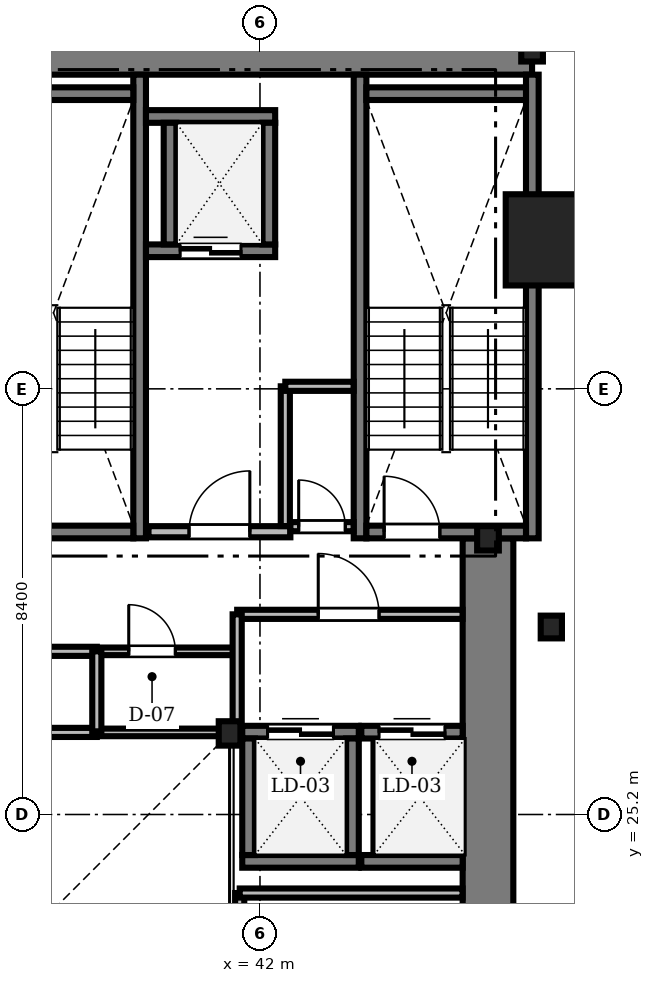
"""IFC4 building model, lengths in metres.
Left out: names, types, materials, properties, quantities, classifications, styles, units other than length and angle.
Written with IfcOpenShell. Run it as: python <this file> out.ifc"""

import sys

from ifc_helpers import new_model, si_unit, direction, frame, frame_2d, origin, origin_2d, place, context, subcontext, project, spatial, rectangle, i_section, extrude, source, transform, mapped, element, fill, save


model = new_model("IFC4")
c1 = context("Model", 3, precision=1e-05, world=origin(), true_north=direction((0.0, 1.0)))
c2 = subcontext(c1, "Body", "Model", "MODEL_VIEW")
j1 = project(units=[si_unit("LENGTHUNIT", "METRE"), si_unit("PLANEANGLEUNIT", "RADIAN")], contexts=[c1])
p1 = place(None, origin())
s1 = spatial("IfcSite", under=j1, at=p1, CompositionType="ELEMENT")
p2 = place(p1, origin())
s2 = spatial("IfcBuilding", under=s1, at=p2, CompositionType="ELEMENT")
p3 = place(p2, frame((0.0, 0.0, 38.55)))
s3 = spatial("IfcBuildingStorey", under=s2, at=p3, CompositionType="ELEMENT", Elevation=38.55)
m1 = source(origin(), c2, "Body", "SweptSolid", [
    extrude(rectangle(XDim=17.52, YDim=1.0, at=frame_2d((8.76, 0.0))), origin(), (0.0, 0.0, 1.0), 3.41),
])
p4 = place(p3, frame((29.85, 40.3, 0.0), z_axis=(0.0, 0.0, 1.0), x_axis=(1.0, 0.0, 0.0)))
e1 = element("IfcWall", 1, at=p4, inside=s3, PredefinedType="SHEAR", context=c2, shape_type="MappedRepresentation", body=[
    mapped(m1, transform((0.0, 0.0, 0.0), scale=1.0)),
])
m2 = source(origin(), c2, "Body", "SweptSolid", [
    extrude(rectangle(XDim=13.15, YDim=1.0, at=frame_2d((6.575, 0.0))), origin(), (0.0, 0.0, 1.0), 3.41),
])
p5 = place(p3, frame((46.5, 17.5, 0.0), z_axis=(0.0, 0.0, 1.0), x_axis=(0.0, 1.0, 0.0)))
e2 = element("IfcWall", 2, at=p5, inside=s3, PredefinedType="SHEAR", context=c2, shape_type="MappedRepresentation", body=[
    mapped(m2, transform((0.0, 0.0, 0.0), scale=1.0)),
])
m3 = source(origin(), c2, "Body", "SweptSolid", [
    extrude(i_section(OverallWidth=0.428, OverallDepth=0.481, WebThickness=0.04, FlangeThickness=0.063, FilletRadius=0.015, at=origin_2d()), origin(), (0.0, 0.0, 1.0), 3.41),
])
for number, where, z_axis, x_axis in (
    (3, (41.4, 26.8, 0.0), (0.0, 0.0, 1.0), (1.0, 0.0, 0.0)),
    (4, (46.5, 30.65, 0.0), (0.0, 0.0, 1.0), (1.0, 0.0, 0.0)),
    (5, (47.37, 40.3, 0.0), (0.0, 0.0, 1.0), (1.0, 0.0, 0.0)),
):
    element("IfcColumn", number, at=place(p3, frame(where, z_axis=z_axis, x_axis=x_axis)), inside=s3, PredefinedType="COLUMN", context=c2, shape_type="MappedRepresentation", body=[
        mapped(m3, transform((0.0, 0.0, 0.0), scale=1.0)),
    ])
m4 = source(origin(), c2, "Body", "SweptSolid", [
    extrude(rectangle(XDim=1.8, YDim=1.8, at=origin_2d()), origin(), (0.0, 0.0, 1.0), 3.41),
])
p6 = place(p3, frame((47.75, 36.54, 0.0), z_axis=(0.0, 0.0, 1.0), x_axis=(1.0, 0.0, 0.0)))
e6 = element("IfcColumn", 6, at=p6, inside=s3, PredefinedType="COLUMN", context=c2, shape_type="MappedRepresentation", body=[
    mapped(m4, transform((0.0, 0.0, 0.0), scale=1.0)),
])
m5 = source(origin(), c2, "Body", "SweptSolid", [
    extrude(i_section(OverallWidth=0.419, OverallDepth=0.449, WebThickness=0.031, FlangeThickness=0.048, FilletRadius=0.015, at=origin_2d()), origin(), (0.0, 0.0, 1.0), 3.41),
])
p7 = place(p3, frame((47.75, 28.9, 0.0), z_axis=(0.0, 0.0, 1.0), x_axis=(1.0, 0.0, 0.0)))
e7 = element("IfcColumn", 7, at=p7, inside=s3, PredefinedType="COLUMN", context=c2, shape_type="MappedRepresentation", body=[
    mapped(m5, transform((0.0, 0.0, 0.0), scale=1.0)),
])
m6 = source(origin(), c2, "Body", "SweptSolid", [
    extrude(rectangle(XDim=9.15, YDim=0.25, at=frame_2d((4.575, 0.0))), origin(), (0.0, 0.0, 1.0), 3.45),
])
p8 = place(p3, frame((39.625, 30.65, 0.0), z_axis=(0.0, 0.0, 1.0), x_axis=(0.0, 1.0, 0.0)))
e8 = element("IfcWall", 8, at=p8, inside=s3, PredefinedType="SOLIDWALL", context=c2, shape_type="MappedRepresentation", body=[
    mapped(m6, transform((0.0, 0.0, 0.0), scale=1.0)),
])
m7 = source(origin(), c2, "Body", "SweptSolid", [
    extrude(rectangle(XDim=3.15, YDim=0.25, at=frame_2d((1.575, 0.0))), origin(), (0.0, 0.0, 1.0), 3.45),
])
p9 = place(p3, frame((36.35, 39.425, 0.0), z_axis=(0.0, 0.0, 1.0), x_axis=(1.0, 0.0, 0.0)))
e9 = element("IfcWall", 9, at=p9, inside=s3, PredefinedType="SOLIDWALL", context=c2, shape_type="MappedRepresentation", body=[
    mapped(m7, transform((0.0, 0.0, 0.0), scale=1.0)),
])
p10 = place(p3, frame((36.35, 30.775, 0.0), z_axis=(0.0, 0.0, 1.0), x_axis=(1.0, 0.0, 0.0)))
e10 = element("IfcWall", 10, at=p10, inside=s3, PredefinedType="SOLIDWALL", context=c2, shape_type="MappedRepresentation", body=[
    mapped(m7, transform((0.0, 0.0, 0.0), scale=1.0)),
])
m8 = source(origin(), c2, "Body", "SweptSolid", [
    extrude(rectangle(XDim=1.1, YDim=2.2, at=frame_2d((0.55, 1.1))), frame((0.0, 0.135, 0.0), z_axis=(0.0, -1.0, 0.0), x_axis=(1.0, 0.0, 0.0)), (0.0, 0.0, 1.0), 0.27),
])
p11 = place(p10, frame((0.35, 0.0, 0.0)))
e11 = element("IfcOpeningElement", 11, at=p11, cuts=e10, PredefinedType="OPENING", context=c2, shape_type="MappedRepresentation", body=[
    mapped(m8, transform((0.0, 0.0, 0.0), scale=1.0)),
])
for number, where, z_axis, x_axis in (
    (12, (43.975, 30.65, 0.0), (0.0, 0.0, 1.0), (0.0, 1.0, 0.0)),
    (13, (47.375, 30.65, 0.0), (0.0, 0.0, 1.0), (0.0, 1.0, 0.0)),
):
    element("IfcWall", number, at=place(p3, frame(where, z_axis=z_axis, x_axis=x_axis)), inside=s3, PredefinedType="SOLIDWALL", context=c2, shape_type="MappedRepresentation", body=[
        mapped(m6, transform((0.0, 0.0, 0.0), scale=1.0)),
    ])
p12 = place(p3, frame((44.1, 39.425, 0.0), z_axis=(0.0, 0.0, 1.0), x_axis=(1.0, 0.0, 0.0)))
e14 = element("IfcWall", 14, at=p12, inside=s3, PredefinedType="SOLIDWALL", context=c2, shape_type="MappedRepresentation", body=[
    mapped(m7, transform((0.0, 0.0, 0.0), scale=1.0)),
])
p13 = place(p3, frame((44.1, 30.775, 0.0), z_axis=(0.0, 0.0, 1.0), x_axis=(1.0, 0.0, 0.0)))
e15 = element("IfcWall", 15, at=p13, inside=s3, PredefinedType="SOLIDWALL", context=c2, shape_type="MappedRepresentation", body=[
    mapped(m7, transform((0.0, 0.0, 0.0), scale=1.0)),
])
p14 = place(p13, frame((0.35, 0.0, 0.0)))
e16 = element("IfcOpeningElement", 16, at=p14, cuts=e15, PredefinedType="OPENING", context=c2, shape_type="MappedRepresentation", body=[
    mapped(m8, transform((0.0, 0.0, 0.0), scale=1.0)),
])
m9 = source(origin(), c2, "Body", "SweptSolid", [
    extrude(rectangle(XDim=2.8, YDim=0.22, at=frame_2d((1.4, 0.0))), origin(), (0.0, 0.0, 1.0), 3.41),
])
p15 = place(p3, frame((39.8, 30.78, 0.0), z_axis=(0.0, 0.0, 1.0), x_axis=(1.0, 0.0, 0.0)))
e17 = element("IfcWall", 17, at=p15, inside=s3, PredefinedType="SOLIDWALL", context=c2, shape_type="MappedRepresentation", body=[
    mapped(m9, transform((0.0, 0.0, 0.0), scale=1.0)),
])
m10 = source(origin(), c2, "Body", "SweptSolid", [
    extrude(rectangle(XDim=1.2, YDim=2.2, at=frame_2d((0.6, 1.1))), frame((0.0, 0.12, 0.0), z_axis=(0.0, -1.0, 0.0), x_axis=(1.0, 0.0, 0.0)), (0.0, 0.0, 1.0), 0.24),
])
p16 = place(p15, frame((0.8, 0.0, 0.0)))
e18 = element("IfcOpeningElement", 18, at=p16, cuts=e17, PredefinedType="OPENING", context=c2, shape_type="MappedRepresentation", body=[
    mapped(m10, transform((0.0, 0.0, 0.0), scale=1.0)),
])
m11 = source(origin(), c2, "Body", "SweptSolid", [
    extrude(rectangle(XDim=2.55, YDim=0.25, at=frame_2d((1.275, 0.0))), origin(), (0.0, 0.0, 1.0), 3.41),
])
p17 = place(p3, frame((39.75, 36.325, 0.0), z_axis=(0.0, 0.0, 1.0), x_axis=(1.0, 0.0, 0.0)))
e19 = element("IfcWall", 19, at=p17, inside=s3, PredefinedType="SOLIDWALL", context=c2, shape_type="MappedRepresentation", body=[
    mapped(m11, transform((0.0, 0.0, 0.0), scale=1.0)),
])
m12 = source(origin(), c2, "Body", "SweptSolid", [
    extrude(rectangle(XDim=1.2, YDim=2.25, at=frame_2d((0.6, 1.125))), frame((0.0, 0.135, 0.0), z_axis=(0.0, -1.0, 0.0), x_axis=(1.0, 0.0, 0.0)), (0.0, 0.0, 1.0), 0.27),
])
p18 = place(p17, frame((0.675, 0.0, 0.0)))
e20 = element("IfcOpeningElement", 20, at=p18, cuts=e19, PredefinedType="OPENING", context=c2, shape_type="MappedRepresentation", body=[
    mapped(m12, transform((0.0, 0.0, 0.0), scale=1.0)),
])
p19 = place(p3, frame((39.75, 38.975, 0.0), z_axis=(0.0, 0.0, 1.0), x_axis=(1.0, 0.0, 0.0)))
e21 = element("IfcWall", 21, at=p19, inside=s3, PredefinedType="SOLIDWALL", context=c2, shape_type="MappedRepresentation", body=[
    mapped(m11, transform((0.0, 0.0, 0.0), scale=1.0)),
])
m13 = source(origin(), c2, "Body", "SweptSolid", [
    extrude(rectangle(XDim=2.4, YDim=0.25, at=frame_2d((1.2, 0.0))), origin(), (0.0, 0.0, 1.0), 3.41),
])
for number, where, z_axis, x_axis in (
    (22, (40.225, 36.45, 0.0), (0.0, 0.0, 1.0), (0.0, 1.0, 0.0)),
    (23, (42.175, 36.45, 0.0), (0.0, 0.0, 1.0), (0.0, 1.0, 0.0)),
):
    element("IfcWall", number, at=place(p3, frame(where, z_axis=z_axis, x_axis=x_axis)), inside=s3, PredefinedType="SOLIDWALL", context=c2, shape_type="MappedRepresentation", body=[
        mapped(m13, transform((0.0, 0.0, 0.0), scale=1.0)),
    ])
m14 = source(origin(), c2, "Body", "SweptSolid", [
    extrude(rectangle(XDim=2.3, YDim=0.25, at=frame_2d((1.15, 0.0))), origin(), (0.0, 0.0, 1.0), 3.41),
])
p20 = place(p3, frame((41.65, 24.275, 0.0), z_axis=(0.0, 0.0, 1.0), x_axis=(1.0, 0.0, 0.0)))
e24 = element("IfcWall", 24, at=p20, inside=s3, PredefinedType="SOLIDWALL", context=c2, shape_type="MappedRepresentation", body=[
    mapped(m14, transform((0.0, 0.0, 0.0), scale=1.0)),
])
p21 = place(p3, frame((41.65, 26.825, 0.0), z_axis=(0.0, 0.0, 1.0), x_axis=(1.0, 0.0, 0.0)))
e25 = element("IfcWall", 25, at=p21, inside=s3, PredefinedType="SOLIDWALL", context=c2, shape_type="MappedRepresentation", body=[
    mapped(m14, transform((0.0, 0.0, 0.0), scale=1.0)),
])
m15 = source(origin(), c2, "Body", "SweptSolid", [
    extrude(rectangle(XDim=1.3, YDim=2.3, at=frame_2d((0.65, 1.15))), frame((0.0, 0.135, 0.0), z_axis=(0.0, -1.0, 0.0), x_axis=(1.0, 0.0, 0.0)), (0.0, 0.0, 1.0), 0.27),
])
p22 = place(p21, frame((0.5, 0.0, 0.0)))
e26 = element("IfcOpeningElement", 26, at=p22, cuts=e25, PredefinedType="OPENING", context=c2, shape_type="MappedRepresentation", body=[
    mapped(m15, transform((0.0, 0.0, 0.0), scale=1.0)),
])
for number, where, z_axis, x_axis in (
    (27, (41.775, 24.4, 0.0), (0.0, 0.0, 1.0), (0.0, 1.0, 0.0)),
    (28, (43.825, 24.4, 0.0), (0.0, 0.0, 1.0), (0.0, 1.0, 0.0)),
):
    element("IfcWall", number, at=place(p3, frame(where, z_axis=z_axis, x_axis=x_axis)), inside=s3, PredefinedType="SOLIDWALL", context=c2, shape_type="MappedRepresentation", body=[
        mapped(m14, transform((0.0, 0.0, 0.0), scale=1.0)),
    ])
m16 = source(origin(), c2, "Body", "SweptSolid", [
    extrude(rectangle(XDim=2.0, YDim=0.25, at=frame_2d((1.0, 0.0))), origin(), (0.0, 0.0, 1.0), 3.41),
])
p23 = place(p3, frame((44.0, 24.275, 0.0), z_axis=(0.0, 0.0, 1.0), x_axis=(1.0, 0.0, 0.0)))
e29 = element("IfcWall", 29, at=p23, inside=s3, PredefinedType="SOLIDWALL", context=c2, shape_type="MappedRepresentation", body=[
    mapped(m16, transform((0.0, 0.0, 0.0), scale=1.0)),
])
p24 = place(p3, frame((44.0, 26.825, 0.0), z_axis=(0.0, 0.0, 1.0), x_axis=(1.0, 0.0, 0.0)))
e30 = element("IfcWall", 30, at=p24, inside=s3, PredefinedType="SOLIDWALL", context=c2, shape_type="MappedRepresentation", body=[
    mapped(m16, transform((0.0, 0.0, 0.0), scale=1.0)),
])
p25 = place(p24, frame((0.35, 0.0, 0.0)))
e31 = element("IfcOpeningElement", 31, at=p25, cuts=e30, PredefinedType="OPENING", context=c2, shape_type="MappedRepresentation", body=[
    mapped(m15, transform((0.0, 0.0, 0.0), scale=1.0)),
])
m17 = source(origin(), c2, "Body", "SweptSolid", [
    extrude(rectangle(XDim=7.33, YDim=0.18, at=frame_2d((3.665, 0.0))), origin(), (0.0, 0.0, 1.0), 3.042),
])
p26 = place(p3, frame((31.45, 28.42, 0.0), z_axis=(0.0, 0.0, 1.0), x_axis=(1.0, 0.0, 0.0)))
e32 = element("IfcWall", 32, at=p26, inside=s3, PredefinedType="PARTITIONING", context=c2, shape_type="MappedRepresentation", body=[
    mapped(m17, transform((0.0, 0.0, 0.0), scale=1.0)),
])
m18 = source(origin(), c2, "Body", "SweptSolid", [
    extrude(rectangle(XDim=0.95, YDim=2.15, at=frame_2d((0.475, 1.075))), frame((0.0, 0.1, 0.0), z_axis=(0.0, -1.0, 0.0), x_axis=(1.0, 0.0, 0.0)), (0.0, 0.0, 1.0), 0.2),
])
p27 = place(p26, frame((0.65, 0.0, 0.0)))
e33 = element("IfcOpeningElement", 33, at=p27, cuts=e32, PredefinedType="OPENING", context=c2, shape_type="MappedRepresentation", body=[
    mapped(m18, transform((0.0, 0.0, 0.0), scale=1.0)),
])
m19 = source(origin(), c2, "Body", "SweptSolid", [
    extrude(rectangle(XDim=4.448, YDim=0.18, at=frame_2d((2.224, 0.0))), origin(), (0.0, 0.0, 1.0), 3.042),
])
p28 = place(p3, frame((41.55, 29.15, 0.0), z_axis=(0.0, 0.0, 1.0), x_axis=(1.0, 0.0, 0.0)))
e34 = element("IfcWall", 34, at=p28, inside=s3, PredefinedType="PARTITIONING", context=c2, shape_type="MappedRepresentation", body=[
    mapped(m19, transform((0.0, 0.0, 0.0), scale=1.0)),
])
m20 = source(origin(), c2, "Body", "SweptSolid", [
    extrude(rectangle(XDim=1.2, YDim=2.2, at=frame_2d((0.6, 1.1))), frame((0.0, 0.1, 0.0), z_axis=(0.0, -1.0, 0.0), x_axis=(1.0, 0.0, 0.0)), (0.0, 0.0, 1.0), 0.2),
])
p29 = place(p28, frame((1.6, 0.0, 0.0)))
e35 = element("IfcOpeningElement", 35, at=p29, cuts=e34, PredefinedType="OPENING", context=c2, shape_type="MappedRepresentation", body=[
    mapped(m20, transform((0.0, 0.0, 0.0), scale=1.0)),
])
m21 = source(origin(), c2, "Body", "SweptSolid", [
    extrude(rectangle(XDim=2.74, YDim=0.15, at=frame_2d((1.37, 0.0))), origin(), (0.0, 0.0, 1.0), 3.41),
])
p30 = place(p3, frame((38.78, 28.42, 0.0), z_axis=(0.0, 0.0, 1.0), x_axis=(1.0, 0.0, 0.0)))
e36 = element("IfcWall", 36, at=p30, inside=s3, PredefinedType="PARTITIONING", context=c2, shape_type="MappedRepresentation", body=[
    mapped(m21, transform((0.0, 0.0, 0.0), scale=1.0)),
])
m22 = source(origin(), c2, "Body", "SweptSolid", [
    extrude(rectangle(XDim=0.92, YDim=2.1, at=frame_2d((0.46, 1.05))), frame((0.0, 0.085, 0.0), z_axis=(0.0, -1.0, 0.0), x_axis=(1.0, 0.0, 0.0)), (0.0, 0.0, 1.0), 0.17),
])
p31 = place(p30, frame((0.63, 0.0, 0.0)))
e37 = element("IfcOpeningElement", 37, at=p31, cuts=e36, PredefinedType="OPENING", context=c2, shape_type="MappedRepresentation", body=[
    mapped(m22, transform((0.0, 0.0, 0.0), scale=1.0)),
])
m23 = source(origin(), c2, "Body", "SweptSolid", [
    extrude(rectangle(XDim=1.248, YDim=0.18, at=frame_2d((0.624, 0.0))), origin(), (0.0, 0.0, 1.0), 3.41),
])
p32 = place(p3, frame((42.6, 30.88, 0.0), z_axis=(0.0, 0.0, 1.0), x_axis=(1.0, 0.0, 0.0)))
e38 = element("IfcWall", 38, at=p32, inside=s3, PredefinedType="PARTITIONING", context=c2, shape_type="MappedRepresentation", body=[
    mapped(m23, transform((0.0, 0.0, 0.0), scale=1.0)),
])
m24 = source(origin(), c2, "Body", "SweptSolid", [
    extrude(rectangle(XDim=0.92, YDim=2.1, at=frame_2d((0.46, 1.05))), frame((0.0, 0.1, 0.0), z_axis=(0.0, -1.0, 0.0), x_axis=(1.0, 0.0, 0.0)), (0.0, 0.0, 1.0), 0.2),
])
p33 = place(p32, frame((0.164, 0.0, 0.0)))
e39 = element("IfcOpeningElement", 39, at=p33, cuts=e38, PredefinedType="OPENING", context=c2, shape_type="MappedRepresentation", body=[
    mapped(m24, transform((0.0, 0.0, 0.0), scale=1.0)),
])
m25 = source(origin(), c2, "Body", "SweptSolid", [
    extrude(rectangle(XDim=7.33, YDim=0.18, at=frame_2d((3.665, 0.0))), origin(), (0.0, 0.0, 1.0), 2.952),
])
p34 = place(p3, frame((31.45, 26.82, 0.0), z_axis=(0.0, 0.0, 1.0), x_axis=(1.0, 0.0, 0.0)))
e40 = element("IfcWall", 40, at=p34, inside=s3, PredefinedType="PARTITIONING", context=c2, shape_type="MappedRepresentation", body=[
    mapped(m25, transform((0.0, 0.0, 0.0), scale=1.0)),
])
m26 = source(origin(), c2, "Body", "SweptSolid", [
    extrude(rectangle(XDim=7.15, YDim=0.18, at=frame_2d((3.575, 0.0))), origin(), (0.0, 0.0, 1.0), 2.802),
])
p35 = place(p3, frame((41.6, 16.5, 0.0), z_axis=(0.0, 0.0, 1.0), x_axis=(0.0, 1.0, 0.0)))
e41 = element("IfcWall", 41, at=p35, inside=s3, PredefinedType="PARTITIONING", context=c2, shape_type="MappedRepresentation", body=[
    mapped(m26, transform((0.0, 0.0, 0.0), scale=1.0)),
])
m27 = source(origin(), c2, "Body", "SweptSolid", [
    extrude(rectangle(XDim=4.398, YDim=0.18, at=frame_2d((2.199, 0.0))), origin(), (0.0, 0.0, 1.0), 3.41),
])
p36 = place(p3, frame((41.6, 23.65, 0.0), z_axis=(0.0, 0.0, 1.0), x_axis=(1.0, 0.0, 0.0)))
e42 = element("IfcWall", 42, at=p36, inside=s3, PredefinedType="PARTITIONING", context=c2, shape_type="MappedRepresentation", body=[
    mapped(m27, transform((0.0, 0.0, 0.0), scale=1.0)),
])
m28 = source(origin(), c2, "Body", "SweptSolid", [
    extrude(rectangle(XDim=2.758, YDim=0.18, at=frame_2d((1.379, 0.0))), origin(), (0.0, 0.0, 1.0), 3.41),
])
p37 = place(p3, frame((42.5, 30.892, 0.0), z_axis=(0.0, 0.0, 1.0), x_axis=(0.0, 1.0, 0.0)))
e43 = element("IfcWall", 43, at=p37, inside=s3, PredefinedType="PARTITIONING", context=c2, shape_type="MappedRepresentation", body=[
    mapped(m28, transform((0.0, 0.0, 0.0), scale=1.0)),
])
m29 = source(origin(), c2, "Body", "SweptSolid", [
    extrude(rectangle(XDim=2.74, YDim=0.15, at=frame_2d((1.37, 0.0))), origin(), (0.0, 0.0, 1.0), 2.802),
])
p38 = place(p3, frame((38.78, 26.82, 0.0), z_axis=(0.0, 0.0, 1.0), x_axis=(1.0, 0.0, 0.0)))
e44 = element("IfcWall", 44, at=p38, inside=s3, PredefinedType="PARTITIONING", context=c2, shape_type="MappedRepresentation", body=[
    mapped(m29, transform((0.0, 0.0, 0.0), scale=1.0)),
])
m30 = source(origin(), c2, "Body", "SweptSolid", [
    extrude(rectangle(XDim=2.35, YDim=0.18, at=frame_2d((1.175, 0.0))), origin(), (0.0, 0.0, 1.0), 2.802),
])
p39 = place(p3, frame((41.55, 26.8, 0.0), z_axis=(0.0, 0.0, 1.0), x_axis=(0.0, 1.0, 0.0)))
e45 = element("IfcWall", 45, at=p39, inside=s3, PredefinedType="PARTITIONING", context=c2, shape_type="MappedRepresentation", body=[
    mapped(m30, transform((0.0, 0.0, 0.0), scale=1.0)),
])
m31 = source(origin(), c2, "Body", "SweptSolid", [
    extrude(rectangle(XDim=1.6, YDim=0.18, at=frame_2d((0.8, 0.0))), origin(), (0.0, 0.0, 1.0), 2.952),
])
p40 = place(p3, frame((38.78, 26.82, 0.0), z_axis=(0.0, 0.0, 1.0), x_axis=(0.0, 1.0, 0.0)))
e46 = element("IfcWall", 46, at=p40, inside=s3, PredefinedType="PARTITIONING", context=c2, shape_type="MappedRepresentation", body=[
    mapped(m31, transform((0.0, 0.0, 0.0), scale=1.0)),
])
m32 = source(origin(), c2, "Body", "SweptSolid", [
    extrude(rectangle(XDim=1.348, YDim=0.18, at=frame_2d((0.674, 0.0))), origin(), (0.0, 0.0, 1.0), 3.41),
])
p41 = place(p3, frame((42.5, 33.65, 0.0), z_axis=(0.0, 0.0, 1.0), x_axis=(1.0, 0.0, 0.0)))
e47 = element("IfcWall", 47, at=p41, inside=s3, PredefinedType="PARTITIONING", context=c2, shape_type="MappedRepresentation", body=[
    mapped(m32, transform((0.0, 0.0, 0.0), scale=1.0)),
])
m33 = source(origin(), c2, "Body", "SweptSolid", [
    extrude(rectangle(XDim=1.1, YDim=2.2, at=frame_2d((0.55, 1.1))), frame((0.0, 0.025, 0.0), z_axis=(0.0, -1.0, 0.0), x_axis=(1.0, 0.0, 0.0)), (0.0, 0.0, 1.0), 0.05),
])
p42 = place(p14, origin())
e48 = element("IfcDoor", 48, at=p42, inside=s3, OperationType="SINGLE_SWING_LEFT", PredefinedType="DOOR", context=c2, shape_type="MappedRepresentation", body=[
    mapped(m33, transform((0.0, 0.0, 0.0), scale=1.0)),
])
fill(e16, e48)
m34 = source(origin(), c2, "Body", "SweptSolid", [
    extrude(rectangle(XDim=1.2, YDim=2.2, at=frame_2d((0.6, 1.1))), frame((0.0, 0.025, 0.0), z_axis=(0.0, -1.0, 0.0), x_axis=(1.0, 0.0, 0.0)), (0.0, 0.0, 1.0), 0.05),
])
p43 = place(p16, origin())
e49 = element("IfcDoor", 49, at=p43, inside=s3, OperationType="SINGLE_SWING_RIGHT", PredefinedType="DOOR", context=c2, shape_type="MappedRepresentation", body=[
    mapped(m34, transform((0.0, 0.0, 0.0), scale=1.0)),
])
fill(e18, e49)
m35 = source(origin(), c2, "Body", "SweptSolid", [
    extrude(rectangle(XDim=1.2, YDim=2.25, at=frame_2d((0.6, 1.125))), frame((0.0, 0.025, 0.0), z_axis=(0.0, -1.0, 0.0), x_axis=(1.0, 0.0, 0.0)), (0.0, 0.0, 1.0), 0.05),
])
p44 = place(p18, origin())
e50 = element("IfcDoor", 50, at=p44, inside=s3, OperationType="DOUBLE_DOOR_SLIDING", PredefinedType="DOOR", context=c2, shape_type="MappedRepresentation", body=[
    mapped(m35, transform((0.0, 0.0, 0.0), scale=1.0)),
])
fill(e20, e50)
m36 = source(origin(), c2, "Body", "SweptSolid", [
    extrude(rectangle(XDim=1.3, YDim=2.3, at=frame_2d((0.65, 1.15))), frame((0.0, 0.025, 0.0), z_axis=(0.0, -1.0, 0.0), x_axis=(1.0, 0.0, 0.0)), (0.0, 0.0, 1.0), 0.05),
])
p45 = place(p22, origin())
e51 = element("IfcDoor", 51, at=p45, inside=s3, OperationType="DOUBLE_DOOR_SLIDING", PredefinedType="DOOR", context=c2, shape_type="MappedRepresentation", body=[
    mapped(m36, transform((0.0, 0.0, 0.0), scale=1.0)),
])
fill(e26, e51)
p46 = place(p25, origin())
e52 = element("IfcDoor", 52, at=p46, inside=s3, OperationType="DOUBLE_DOOR_SLIDING", PredefinedType="DOOR", context=c2, shape_type="MappedRepresentation", body=[
    mapped(m36, transform((0.0, 0.0, 0.0), scale=1.0)),
])
fill(e31, e52)
p47 = place(p29, origin())
e53 = element("IfcDoor", 53, at=p47, inside=s3, OperationType="SINGLE_SWING_LEFT", PredefinedType="DOOR", context=c2, shape_type="MappedRepresentation", body=[
    mapped(m34, transform((0.0, 0.0, 0.0), scale=1.0)),
])
fill(e35, e53)
m37 = source(origin(), c2, "Body", "SweptSolid", [
    extrude(rectangle(XDim=0.92, YDim=2.1, at=frame_2d((0.46, 1.05))), frame((0.0, 0.025, 0.0), z_axis=(0.0, -1.0, 0.0), x_axis=(1.0, 0.0, 0.0)), (0.0, 0.0, 1.0), 0.05),
])
p48 = place(p31, origin())
e54 = element("IfcDoor", 54, at=p48, inside=s3, OperationType="SINGLE_SWING_LEFT", PredefinedType="DOOR", context=c2, shape_type="MappedRepresentation", body=[
    mapped(m37, transform((0.0, 0.0, 0.0), scale=1.0)),
])
fill(e37, e54)
p49 = place(p33, origin())
e55 = element("IfcDoor", 55, at=p49, inside=s3, OperationType="SINGLE_SWING_LEFT", PredefinedType="DOOR", context=c2, shape_type="MappedRepresentation", body=[
    mapped(m37, transform((0.0, 0.0, 0.0), scale=1.0)),
])
fill(e39, e55)
save(model, sys.argv[1])
